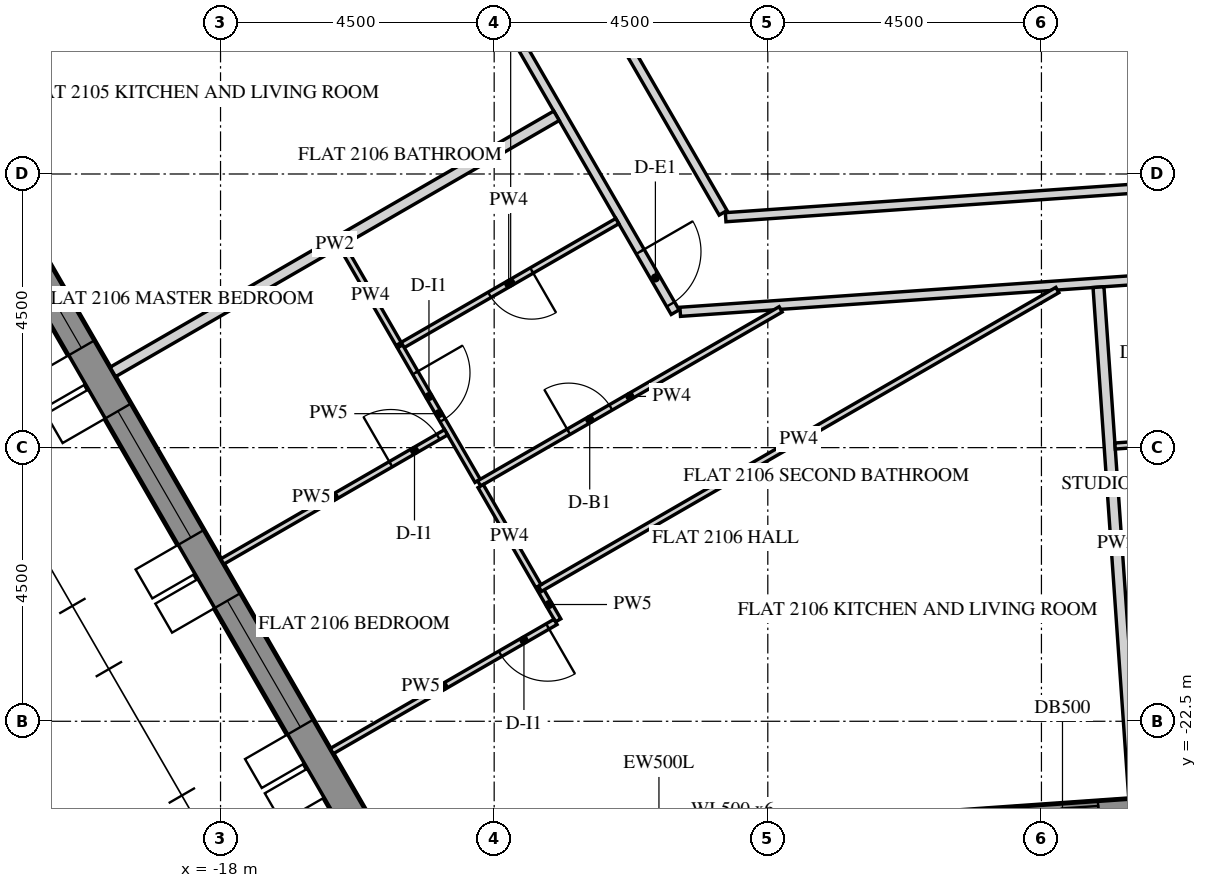
"""IFC4 building model, lengths in metres.
Left out: names, types, materials, properties, quantities, classifications, styles, units other than length and angle.
Written with IfcOpenShell. Run it as: python <this file> out.ifc"""

import sys

from ifc_helpers import new_model, si_unit, direction, frame, frame_2d, origin, place, context, subcontext, project, spatial, polyline, rectangle, outline, extrude, element, fill, save


model = new_model("IFC4")
c1 = context("Model", 3, precision=1e-05, world=origin(), true_north=direction((0.0, 1.0)))
c2 = subcontext(c1, "Body", "Model", "MODEL_VIEW")
j1 = project(units=[si_unit("LENGTHUNIT", "METRE"), si_unit("PLANEANGLEUNIT", "RADIAN")], contexts=[c1])
p1 = place(None, origin())
s1 = spatial("IfcSite", under=j1, at=p1, CompositionType="ELEMENT")
p2 = place(p1, origin())
s2 = spatial("IfcBuilding", under=s1, at=p2, CompositionType="ELEMENT")
p3 = place(p2, frame((0.0, 0.0, 267.9)))
s3 = spatial("IfcBuildingStorey", under=s2, at=p3, CompositionType="ELEMENT", Elevation=267.9)
p4 = place(p3, frame((-28.149, -2.745, -0.15), z_axis=(0.0, 0.0, 1.0), x_axis=(0.500003737743, -0.866023245787, 0.0)))
e1 = element("IfcWall", 1, at=p4, inside=s3, PredefinedType="SOLIDWALL", context=c2, shape_type="SweptSolid", body=[
    extrude(outline(polyline([(-0.021, -0.25), (25.468, -0.25), (25.421, 0.25), (0.021, 0.25), (-0.021, -0.25)])), origin(), (0.0, 0.0, 1.0), 3.9),
])
p5 = place(p4, frame((2.522, 0.0, 0.75)))
e2 = element("IfcOpeningElement", 2, at=p5, cuts=e1, PredefinedType="OPENING", context=c2, shape_type="SweptSolid", body=[
    extrude(rectangle(XDim=2.4, YDim=2.7, at=frame_2d((1.2, 1.35))), frame((0.0, 0.26, 0.0), z_axis=(0.0, -1.0, 0.0), x_axis=(1.0, 0.0, 0.0)), (0.0, 0.0, 1.0), 0.52),
])
p6 = place(p4, frame((6.122, 0.0, 0.75)))
e3 = element("IfcOpeningElement", 3, at=p6, cuts=e1, PredefinedType="OPENING", context=c2, shape_type="SweptSolid", body=[
    extrude(rectangle(XDim=2.4, YDim=2.7, at=frame_2d((1.2, 1.35))), frame((0.0, 0.26, 0.0), z_axis=(0.0, -1.0, 0.0), x_axis=(1.0, 0.0, 0.0)), (0.0, 0.0, 1.0), 0.52),
])
p7 = place(p4, frame((9.722, 0.0, 0.75)))
e4 = element("IfcOpeningElement", 4, at=p7, cuts=e1, PredefinedType="OPENING", context=c2, shape_type="SweptSolid", body=[
    extrude(rectangle(XDim=2.4, YDim=2.7, at=frame_2d((1.2, 1.35))), frame((0.0, 0.26, 0.0), z_axis=(0.0, -1.0, 0.0), x_axis=(1.0, 0.0, 0.0)), (0.0, 0.0, 1.0), 0.52),
])
p8 = place(p4, frame((13.323, 0.0, 0.75)))
e5 = element("IfcOpeningElement", 5, at=p8, cuts=e1, PredefinedType="OPENING", context=c2, shape_type="SweptSolid", body=[
    extrude(rectangle(XDim=2.4, YDim=2.7, at=frame_2d((1.2, 1.35))), frame((0.0, 0.26, 0.0), z_axis=(0.0, -1.0, 0.0), x_axis=(1.0, 0.0, 0.0)), (0.0, 0.0, 1.0), 0.52),
])
p9 = place(p4, frame((16.922, 0.0, 0.75)))
e6 = element("IfcOpeningElement", 6, at=p9, cuts=e1, PredefinedType="OPENING", context=c2, shape_type="SweptSolid", body=[
    extrude(rectangle(XDim=2.4, YDim=2.7, at=frame_2d((1.2, 1.35))), frame((0.0, 0.26, 0.0), z_axis=(0.0, -1.0, 0.0), x_axis=(1.0, 0.0, 0.0)), (0.0, 0.0, 1.0), 0.52),
])
p10 = place(p4, frame((20.522, 0.0, 0.75)))
e7 = element("IfcOpeningElement", 7, at=p10, cuts=e1, PredefinedType="OPENING", context=c2, shape_type="SweptSolid", body=[
    extrude(rectangle(XDim=2.4, YDim=2.7, at=frame_2d((1.2, 1.35))), frame((0.0, 0.26, 0.0), z_axis=(0.0, -1.0, 0.0), x_axis=(1.0, 0.0, 0.0)), (0.0, 0.0, 1.0), 0.52),
])
p11 = place(p3, frame((-10.86, -24.567, -0.15), z_axis=(0.0, 0.0, 1.0), x_axis=(0.997564329317, 0.06975248292, 0.0)))
e8 = element("IfcWall", 8, at=p11, inside=s3, PredefinedType="SOLIDWALL", context=c2, shape_type="SweptSolid", body=[
    extrude(outline(polyline([(0.25, -0.25), (22.795, -0.25), (23.295, 0.25), (-0.25, 0.25), (0.25, -0.25)])), origin(), (0.0, 0.0, 1.0), 3.9),
])
p12 = place(p11, frame((1.323, 0.0, 1.05)))
e9 = element("IfcOpeningElement", 9, at=p12, cuts=e8, PredefinedType="OPENING", context=c2, shape_type="SweptSolid", body=[
    extrude(rectangle(XDim=0.9, YDim=1.5, at=frame_2d((0.45, 0.75))), frame((0.0, 0.26, 0.0), z_axis=(0.0, -1.0, 0.0), x_axis=(1.0, 0.0, 0.0)), (0.0, 0.0, 1.0), 0.52),
])
p13 = place(p11, frame((2.522, 0.0, 0.15)))
e10 = element("IfcOpeningElement", 10, at=p13, cuts=e8, PredefinedType="OPENING", context=c2, shape_type="SweptSolid", body=[
    extrude(rectangle(XDim=1.2, YDim=2.4, at=frame_2d((0.6, 1.2))), frame((0.0, 0.26, 0.0), z_axis=(0.0, -1.0, 0.0), x_axis=(1.0, 0.0, 0.0)), (0.0, 0.0, 1.0), 0.52),
])
p14 = place(p11, frame((4.922, 0.0, 1.05)))
e11 = element("IfcOpeningElement", 11, at=p14, cuts=e8, PredefinedType="OPENING", context=c2, shape_type="SweptSolid", body=[
    extrude(rectangle(XDim=0.9, YDim=1.5, at=frame_2d((0.45, 0.75))), frame((0.0, 0.26, 0.0), z_axis=(0.0, -1.0, 0.0), x_axis=(1.0, 0.0, 0.0)), (0.0, 0.0, 1.0), 0.52),
])
p15 = place(p11, frame((6.122, 0.0, 0.15)))
e12 = element("IfcOpeningElement", 12, at=p15, cuts=e8, PredefinedType="OPENING", context=c2, shape_type="SweptSolid", body=[
    extrude(rectangle(XDim=1.2, YDim=2.4, at=frame_2d((0.6, 1.2))), frame((0.0, 0.26, 0.0), z_axis=(0.0, -1.0, 0.0), x_axis=(1.0, 0.0, 0.0)), (0.0, 0.0, 1.0), 0.52),
])
p16 = place(p11, frame((8.522, 0.0, 1.05)))
e13 = element("IfcOpeningElement", 13, at=p16, cuts=e8, PredefinedType="OPENING", context=c2, shape_type="SweptSolid", body=[
    extrude(rectangle(XDim=0.9, YDim=1.5, at=frame_2d((0.45, 0.75))), frame((0.0, 0.26, 0.0), z_axis=(0.0, -1.0, 0.0), x_axis=(1.0, 0.0, 0.0)), (0.0, 0.0, 1.0), 0.52),
])
p17 = place(p11, frame((9.722, 0.0, 0.15)))
e14 = element("IfcOpeningElement", 14, at=p17, cuts=e8, PredefinedType="OPENING", context=c2, shape_type="SweptSolid", body=[
    extrude(rectangle(XDim=1.2, YDim=2.4, at=frame_2d((0.6, 1.2))), frame((0.0, 0.26, 0.0), z_axis=(0.0, -1.0, 0.0), x_axis=(1.0, 0.0, 0.0)), (0.0, 0.0, 1.0), 0.52),
])
p18 = place(p11, frame((12.122, 0.0, 1.05)))
e15 = element("IfcOpeningElement", 15, at=p18, cuts=e8, PredefinedType="OPENING", context=c2, shape_type="SweptSolid", body=[
    extrude(rectangle(XDim=0.9, YDim=1.5, at=frame_2d((0.45, 0.75))), frame((0.0, 0.26, 0.0), z_axis=(0.0, -1.0, 0.0), x_axis=(1.0, 0.0, 0.0)), (0.0, 0.0, 1.0), 0.52),
])
p19 = place(p11, frame((13.323, 0.0, 0.15)))
e16 = element("IfcOpeningElement", 16, at=p19, cuts=e8, PredefinedType="OPENING", context=c2, shape_type="SweptSolid", body=[
    extrude(rectangle(XDim=1.2, YDim=2.4, at=frame_2d((0.6, 1.2))), frame((0.0, 0.26, 0.0), z_axis=(0.0, -1.0, 0.0), x_axis=(1.0, 0.0, 0.0)), (0.0, 0.0, 1.0), 0.52),
])
p20 = place(p11, frame((15.722, 0.0, 1.05)))
e17 = element("IfcOpeningElement", 17, at=p20, cuts=e8, PredefinedType="OPENING", context=c2, shape_type="SweptSolid", body=[
    extrude(rectangle(XDim=0.9, YDim=1.5, at=frame_2d((0.45, 0.75))), frame((0.0, 0.26, 0.0), z_axis=(0.0, -1.0, 0.0), x_axis=(1.0, 0.0, 0.0)), (0.0, 0.0, 1.0), 0.52),
])
p21 = place(p11, frame((16.922, 0.0, 0.15)))
e18 = element("IfcOpeningElement", 18, at=p21, cuts=e8, PredefinedType="OPENING", context=c2, shape_type="SweptSolid", body=[
    extrude(rectangle(XDim=1.2, YDim=2.4, at=frame_2d((0.6, 1.2))), frame((0.0, 0.26, 0.0), z_axis=(0.0, -1.0, 0.0), x_axis=(1.0, 0.0, 0.0)), (0.0, 0.0, 1.0), 0.52),
])
p22 = place(p11, frame((19.323, 0.0, 1.05)))
e19 = element("IfcOpeningElement", 19, at=p22, cuts=e8, PredefinedType="OPENING", context=c2, shape_type="SweptSolid", body=[
    extrude(rectangle(XDim=0.9, YDim=1.5, at=frame_2d((0.45, 0.75))), frame((0.0, 0.26, 0.0), z_axis=(0.0, -1.0, 0.0), x_axis=(1.0, 0.0, 0.0)), (0.0, 0.0, 1.0), 0.52),
])
p23 = place(p11, frame((20.522, 0.0, 0.15)))
e20 = element("IfcOpeningElement", 20, at=p23, cuts=e8, PredefinedType="OPENING", context=c2, shape_type="SweptSolid", body=[
    extrude(rectangle(XDim=1.2, YDim=2.4, at=frame_2d((0.6, 1.2))), frame((0.0, 0.26, 0.0), z_axis=(0.0, -1.0, 0.0), x_axis=(1.0, 0.0, 0.0)), (0.0, 0.0, 1.0), 0.52),
])
p24 = place(p3, frame((-17.998, -2.826, 0.0), z_axis=(0.0, 0.0, 1.0), x_axis=(0.500003306199, -0.866023494941, 0.0)))
e21 = element("IfcWall", 21, at=p24, inside=s3, PredefinedType="PARTITIONING", context=c2, shape_type="SweptSolid", body=[
    extrude(rectangle(XDim=14.949, YDim=0.15, at=frame_2d((7.475, 0.0))), origin(), (0.0, 0.0, 1.0), 2.988),
])
p25 = place(p24, frame((2.925, 0.0, 0.0)))
e22 = element("IfcOpeningElement", 22, at=p25, cuts=e21, PredefinedType="OPENING", context=c2, shape_type="SweptSolid", body=[
    extrude(rectangle(XDim=1.0, YDim=2.1, at=frame_2d((0.5, 1.05))), frame((0.0, 0.085, 0.0), z_axis=(0.0, -1.0, 0.0), x_axis=(1.0, 0.0, 0.0)), (0.0, 0.0, 1.0), 0.17),
])
p26 = place(p24, frame((13.799, 0.0, 0.0)))
e23 = element("IfcOpeningElement", 23, at=p26, cuts=e21, PredefinedType="OPENING", context=c2, shape_type="SweptSolid", body=[
    extrude(rectangle(XDim=1.0, YDim=2.1, at=frame_2d((0.5, 1.05))), frame((0.0, 0.085, 0.0), z_axis=(0.0, -1.0, 0.0), x_axis=(1.0, 0.0, 0.0)), (0.0, 0.0, 1.0), 0.17),
])
p27 = place(p3, frame((-10.44, -15.767, 0.0), z_axis=(0.0, 0.0, 1.0), x_axis=(0.997565037323, 0.069742356651, 0.0)))
e24 = element("IfcWall", 24, at=p27, inside=s3, PredefinedType="PARTITIONING", context=c2, shape_type="SweptSolid", body=[
    extrude(rectangle(XDim=16.939, YDim=0.15, at=frame_2d((8.47, 0.0))), origin(), (0.0, 0.0, 1.0), 2.988),
])
p28 = place(p27, frame((9.79, 0.0, 0.0)))
e25 = element("IfcOpeningElement", 25, at=p28, cuts=e24, PredefinedType="OPENING", context=c2, shape_type="SweptSolid", body=[
    extrude(rectangle(XDim=1.0, YDim=2.1, at=frame_2d((0.5, 1.05))), frame((0.0, 0.085, 0.0), z_axis=(0.0, -1.0, 0.0), x_axis=(1.0, 0.0, 0.0)), (0.0, 0.0, 1.0), 0.17),
])
p29 = place(p27, frame((15.39, 0.0, 0.0)))
e26 = element("IfcOpeningElement", 26, at=p29, cuts=e24, PredefinedType="OPENING", context=c2, shape_type="SweptSolid", body=[
    extrude(rectangle(XDim=1.0, YDim=2.1, at=frame_2d((0.5, 1.05))), frame((0.0, 0.085, 0.0), z_axis=(0.0, -1.0, 0.0), x_axis=(1.0, 0.0, 0.0)), (0.0, 0.0, 1.0), 0.17),
])
p30 = place(p3, frame((6.884, -13.052, 0.0), z_axis=(0.0, 0.0, 1.0), x_axis=(-0.997564224443, -0.069753982764, 0.0)))
e27 = element("IfcWall", 27, at=p30, inside=s3, PredefinedType="PARTITIONING", context=c2, shape_type="SweptSolid", body=[
    extrude(rectangle(XDim=16.618, YDim=0.15, at=frame_2d((8.309, 0.0))), origin(), (0.0, 0.0, 1.0), 2.988),
])
p31 = place(p30, frame((7.859, 0.0, 0.0)))
e28 = element("IfcOpeningElement", 28, at=p31, cuts=e27, PredefinedType="OPENING", context=c2, shape_type="SweptSolid", body=[
    extrude(rectangle(XDim=0.9, YDim=2.1, at=frame_2d((0.45, 1.05))), frame((0.0, 0.085, 0.0), z_axis=(0.0, -1.0, 0.0), x_axis=(1.0, 0.0, 0.0)), (0.0, 0.0, 1.0), 0.17),
])
p32 = place(p3, frame((-9.735, -14.138, 0.0), z_axis=(0.0, 0.0, 1.0), x_axis=(-0.500018385592, 0.866014788598, 0.0)))
e29 = element("IfcWall", 29, at=p32, inside=s3, PredefinedType="PARTITIONING", context=c2, shape_type="SweptSolid", body=[
    extrude(rectangle(XDim=6.356, YDim=0.15, at=frame_2d((3.178, 0.0))), origin(), (0.0, 0.0, 1.0), 2.988),
])
p33 = place(p3, frame((-19.771, -16.755, 0.0), z_axis=(0.0, 0.0, 1.0), x_axis=(0.866026819143, 0.499997548519, 0.0)))
e30 = element("IfcWall", 30, at=p33, inside=s3, PredefinedType="PARTITIONING", context=c2, shape_type="SweptSolid", body=[
    extrude(rectangle(XDim=8.425, YDim=0.18, at=frame_2d((4.212, 0.0))), origin(), (0.0, 0.0, 1.0), 2.988),
])
p34 = place(p3, frame((-12.748, -20.319, 0.0), z_axis=(0.0, 0.0, 1.0), x_axis=(0.500108649621, -0.865962665808, 0.0)))
e31 = element("IfcWall", 31, at=p34, inside=s3, PredefinedType="PARTITIONING", context=c2, shape_type="SweptSolid", body=[
    extrude(rectangle(XDim=0.602, YDim=0.1, at=frame_2d((0.301, 0.0))), origin(), (0.0, 0.0, 1.0), 2.988),
])
p35 = place(p3, frame((-12.491, -20.865, 0.0), z_axis=(0.0, 0.0, 1.0), x_axis=(-0.866014341725, -0.50001915956, 0.0)))
e32 = element("IfcWall", 32, at=p35, inside=s3, PredefinedType="PARTITIONING", context=c2, shape_type="SweptSolid", body=[
    extrude(rectangle(XDim=4.25, YDim=0.1, at=frame_2d((2.125, 0.0))), origin(), (0.0, 0.0, 1.0), 2.988),
])
p36 = place(p35, frame((0.15, 0.0, 0.0)))
e33 = element("IfcOpeningElement", 33, at=p36, cuts=e32, PredefinedType="OPENING", context=c2, shape_type="SweptSolid", body=[
    extrude(rectangle(XDim=0.9, YDim=2.1, at=frame_2d((0.45, 1.05))), frame((0.0, 0.06, 0.0), z_axis=(0.0, -1.0, 0.0), x_axis=(1.0, 0.0, 0.0)), (0.0, 0.0, 1.0), 0.12),
])
p37 = place(p3, frame((-4.238, -15.408, 0.0), z_axis=(0.0, 0.0, 1.0), x_axis=(-0.86602504101, -0.500000628343, 0.0)))
e34 = element("IfcWall", 34, at=p37, inside=s3, PredefinedType="PARTITIONING", context=c2, shape_type="SweptSolid", body=[
    extrude(rectangle(XDim=9.826, YDim=0.1, at=frame_2d((4.913, 0.0))), origin(), (0.0, 0.0, 1.0), 2.988),
])
p38 = place(p3, frame((-2.974, -23.765, 0.0), z_axis=(0.0, 0.0, 1.0), x_axis=(-0.069749826803, 0.997564515037, 0.0)))
e35 = element("IfcWall", 35, at=p38, inside=s3, PredefinedType="PARTITIONING", context=c2, shape_type="SweptSolid", body=[
    extrude(rectangle(XDim=8.425, YDim=0.18, at=frame_2d((4.212, 0.0))), origin(), (0.0, 0.0, 1.0), 2.988),
])
p39 = place(p3, frame((-11.475, -14.275, 0.0), z_axis=(0.0, 0.0, 1.0), x_axis=(-0.866019999656, -0.500009360108, 0.0)))
e36 = element("IfcWall", 36, at=p39, inside=s3, PredefinedType="PARTITIONING", context=c2, shape_type="SweptSolid", body=[
    extrude(rectangle(XDim=4.125, YDim=0.1, at=frame_2d((2.062, 0.0))), origin(), (0.0, 0.0, 1.0), 2.988),
])
p40 = place(p39, frame((1.625, 0.0, 0.0)))
e37 = element("IfcOpeningElement", 37, at=p40, cuts=e36, PredefinedType="OPENING", context=c2, shape_type="SweptSolid", body=[
    extrude(rectangle(XDim=0.8, YDim=2.1, at=frame_2d((0.4, 1.05))), frame((0.0, 0.06, 0.0), z_axis=(0.0, -1.0, 0.0), x_axis=(1.0, 0.0, 0.0)), (0.0, 0.0, 1.0), 0.12),
])
p41 = place(p3, frame((-15.048, -16.335, 0.0), z_axis=(0.0, 0.0, 1.0), x_axis=(0.500014808323, -0.866016854026, 0.0)))
e38 = element("IfcWall", 38, at=p41, inside=s3, PredefinedType="PARTITIONING", context=c2, shape_type="SweptSolid", body=[
    extrude(rectangle(XDim=2.554, YDim=0.1, at=frame_2d((1.277, 0.0))), origin(), (0.0, 0.0, 1.0), 2.988),
])
p42 = place(p41, frame((0.502, 0.0, 0.0)))
e39 = element("IfcOpeningElement", 39, at=p42, cuts=e38, PredefinedType="OPENING", context=c2, shape_type="SweptSolid", body=[
    extrude(rectangle(XDim=0.9, YDim=2.1, at=frame_2d((0.45, 1.05))), frame((0.0, 0.06, 0.0), z_axis=(0.0, -1.0, 0.0), x_axis=(1.0, 0.0, 0.0)), (0.0, 0.0, 1.0), 0.12),
])
p43 = place(p3, frame((-13.747, -18.589, 0.0), z_axis=(0.0, 0.0, 1.0), x_axis=(0.866022251081, 0.500005460603, 0.0)))
e40 = element("IfcWall", 40, at=p43, inside=s3, PredefinedType="PARTITIONING", context=c2, shape_type="SweptSolid", body=[
    extrude(rectangle(XDim=5.725, YDim=0.1, at=frame_2d((2.863, 0.0))), origin(), (0.0, 0.0, 1.0), 2.988),
])
p44 = place(p43, frame((1.7, 0.0, 0.0)))
e41 = element("IfcOpeningElement", 41, at=p44, cuts=e40, PredefinedType="OPENING", context=c2, shape_type="SweptSolid", body=[
    extrude(rectangle(XDim=0.8, YDim=2.1, at=frame_2d((0.4, 1.05))), frame((0.0, 0.06, 0.0), z_axis=(0.0, -1.0, 0.0), x_axis=(1.0, 0.0, 0.0)), (0.0, 0.0, 1.0), 0.12),
])
p45 = place(p3, frame((-16.002, -14.683, 0.0), z_axis=(0.0, 0.0, 1.0), x_axis=(0.500059143742, -0.865991254436, 0.0)))
e42 = element("IfcWall", 42, at=p45, inside=s3, PredefinedType="PARTITIONING", context=c2, shape_type="SweptSolid", body=[
    extrude(rectangle(XDim=1.862, YDim=0.1, at=frame_2d((0.931, 0.0))), origin(), (0.0, 0.0, 1.0), 2.988),
])
p46 = place(p3, frame((-17.971, -19.873, 0.0), z_axis=(0.0, 0.0, 1.0), x_axis=(0.866028703517, 0.499994284652, 0.0)))
e43 = element("IfcWall", 43, at=p46, inside=s3, PredefinedType="PARTITIONING", context=c2, shape_type="SweptSolid", body=[
    extrude(rectangle(XDim=4.25, YDim=0.1, at=frame_2d((2.125, 0.0))), origin(), (0.0, 0.0, 1.0), 2.988),
])
p47 = place(p46, frame((3.2, 0.0, 0.0)))
e44 = element("IfcOpeningElement", 44, at=p47, cuts=e43, PredefinedType="OPENING", context=c2, shape_type="SweptSolid", body=[
    extrude(rectangle(XDim=0.9, YDim=2.1, at=frame_2d((0.45, 1.05))), frame((0.0, 0.06, 0.0), z_axis=(0.0, -1.0, 0.0), x_axis=(1.0, 0.0, 0.0)), (0.0, 0.0, 1.0), 0.12),
])
p48 = place(p3, frame((-12.772, -20.278, 0.0), z_axis=(0.0, 0.0, 1.0), x_axis=(-0.499967155389, 0.866044365799, 0.0)))
e45 = element("IfcWall", 45, at=p48, inside=s3, PredefinedType="PARTITIONING", context=c2, shape_type="SweptSolid", body=[
    extrude(rectangle(XDim=1.9, YDim=0.1, at=frame_2d((0.95, 0.0))), origin(), (0.0, 0.0, 1.0), 2.988),
])
p49 = place(p3, frame((-1.434, -17.844, 0.0), z_axis=(0.0, 0.0, 1.0), x_axis=(-0.997568101915, -0.069698508173, 0.0)))
e46 = element("IfcWall", 46, at=p49, inside=s3, PredefinedType="PARTITIONING", context=c2, shape_type="SweptSolid", body=[
    extrude(rectangle(XDim=1.86, YDim=0.1, at=frame_2d((0.93, 0.0))), origin(), (0.0, 0.0, 1.0), 2.988),
])
p50 = place(p8, frame((0.0, 0.18, 0.0)))
e47 = element("IfcWindow", 47, at=p50, inside=s3, PartitioningType="DOUBLE_PANEL_VERTICAL", PredefinedType="WINDOW", context=c2, shape_type="SweptSolid", body=[
    extrude(rectangle(XDim=2.4, YDim=2.7, at=frame_2d((1.2, 1.35))), frame((0.0, 0.03, 0.0), z_axis=(0.0, -1.0, 0.0), x_axis=(1.0, 0.0, 0.0)), (0.0, 0.0, 1.0), 0.06),
])
fill(e5, e47)
p51 = place(p9, frame((0.0, 0.18, 0.0)))
e48 = element("IfcWindow", 48, at=p51, inside=s3, PartitioningType="DOUBLE_PANEL_VERTICAL", PredefinedType="WINDOW", context=c2, shape_type="SweptSolid", body=[
    extrude(rectangle(XDim=2.4, YDim=2.7, at=frame_2d((1.2, 1.35))), frame((0.0, 0.03, 0.0), z_axis=(0.0, -1.0, 0.0), x_axis=(1.0, 0.0, 0.0)), (0.0, 0.0, 1.0), 0.06),
])
fill(e6, e48)
p52 = place(p10, frame((0.0, 0.18, 0.0)))
e49 = element("IfcWindow", 49, at=p52, inside=s3, PartitioningType="DOUBLE_PANEL_VERTICAL", PredefinedType="WINDOW", context=c2, shape_type="SweptSolid", body=[
    extrude(rectangle(XDim=2.4, YDim=2.7, at=frame_2d((1.2, 1.35))), frame((0.0, 0.03, 0.0), z_axis=(0.0, -1.0, 0.0), x_axis=(1.0, 0.0, 0.0)), (0.0, 0.0, 1.0), 0.06),
])
fill(e7, e49)
p53 = place(p15, frame((0.0, 0.175, 0.0)))
e50 = element("IfcDoor", 50, at=p53, inside=s3, OperationType="SLIDING_TO_LEFT", PredefinedType="DOOR", context=c2, shape_type="SweptSolid", body=[
    extrude(rectangle(XDim=1.2, YDim=2.4, at=frame_2d((0.6, 1.2))), frame((0.0, 0.025, 0.0), z_axis=(0.0, -1.0, 0.0), x_axis=(1.0, 0.0, 0.0)), (0.0, 0.0, 1.0), 0.05),
])
fill(e12, e50)
p54 = place(p26, origin())
e51 = element("IfcDoor", 51, at=p54, inside=s3, OperationType="SINGLE_SWING_LEFT", PredefinedType="DOOR", context=c2, shape_type="SweptSolid", body=[
    extrude(rectangle(XDim=1.0, YDim=2.1, at=frame_2d((0.5, 1.05))), frame((0.0, 0.025, 0.0), z_axis=(0.0, -1.0, 0.0), x_axis=(1.0, 0.0, 0.0)), (0.0, 0.0, 1.0), 0.05),
])
fill(e23, e51)
p55 = place(p40, origin())
e52 = element("IfcDoor", 52, at=p55, inside=s3, OperationType="SINGLE_SWING_RIGHT", PredefinedType="DOOR", context=c2, shape_type="SweptSolid", body=[
    extrude(rectangle(XDim=0.8, YDim=2.1, at=frame_2d((0.4, 1.05))), frame((0.0, 0.025, 0.0), z_axis=(0.0, -1.0, 0.0), x_axis=(1.0, 0.0, 0.0)), (0.0, 0.0, 1.0), 0.05),
])
fill(e37, e52)
p56 = place(p42, origin())
e53 = element("IfcDoor", 53, at=p56, inside=s3, OperationType="SINGLE_SWING_LEFT", PredefinedType="DOOR", context=c2, shape_type="SweptSolid", body=[
    extrude(rectangle(XDim=0.9, YDim=2.1, at=frame_2d((0.45, 1.05))), frame((0.0, 0.025, 0.0), z_axis=(0.0, -1.0, 0.0), x_axis=(1.0, 0.0, 0.0)), (0.0, 0.0, 1.0), 0.05),
])
fill(e39, e53)
p57 = place(p47, origin())
e54 = element("IfcDoor", 54, at=p57, inside=s3, OperationType="SINGLE_SWING_RIGHT", PredefinedType="DOOR", context=c2, shape_type="SweptSolid", body=[
    extrude(rectangle(XDim=0.9, YDim=2.1, at=frame_2d((0.45, 1.05))), frame((0.0, 0.025, 0.0), z_axis=(0.0, -1.0, 0.0), x_axis=(1.0, 0.0, 0.0)), (0.0, 0.0, 1.0), 0.05),
])
fill(e44, e54)
p58 = place(p36, origin())
e55 = element("IfcDoor", 55, at=p58, inside=s3, OperationType="SINGLE_SWING_RIGHT", PredefinedType="DOOR", context=c2, shape_type="SweptSolid", body=[
    extrude(rectangle(XDim=0.9, YDim=2.1, at=frame_2d((0.45, 1.05))), frame((0.0, 0.025, 0.0), z_axis=(0.0, -1.0, 0.0), x_axis=(1.0, 0.0, 0.0)), (0.0, 0.0, 1.0), 0.05),
])
fill(e33, e55)
p59 = place(p44, origin())
e56 = element("IfcDoor", 56, at=p59, inside=s3, OperationType="SINGLE_SWING_RIGHT", PredefinedType="DOOR", context=c2, shape_type="SweptSolid", body=[
    extrude(rectangle(XDim=0.8, YDim=2.1, at=frame_2d((0.4, 1.05))), frame((0.0, 0.025, 0.0), z_axis=(0.0, -1.0, 0.0), x_axis=(1.0, 0.0, 0.0)), (0.0, 0.0, 1.0), 0.05),
])
fill(e41, e56)
save(model, sys.argv[1])
